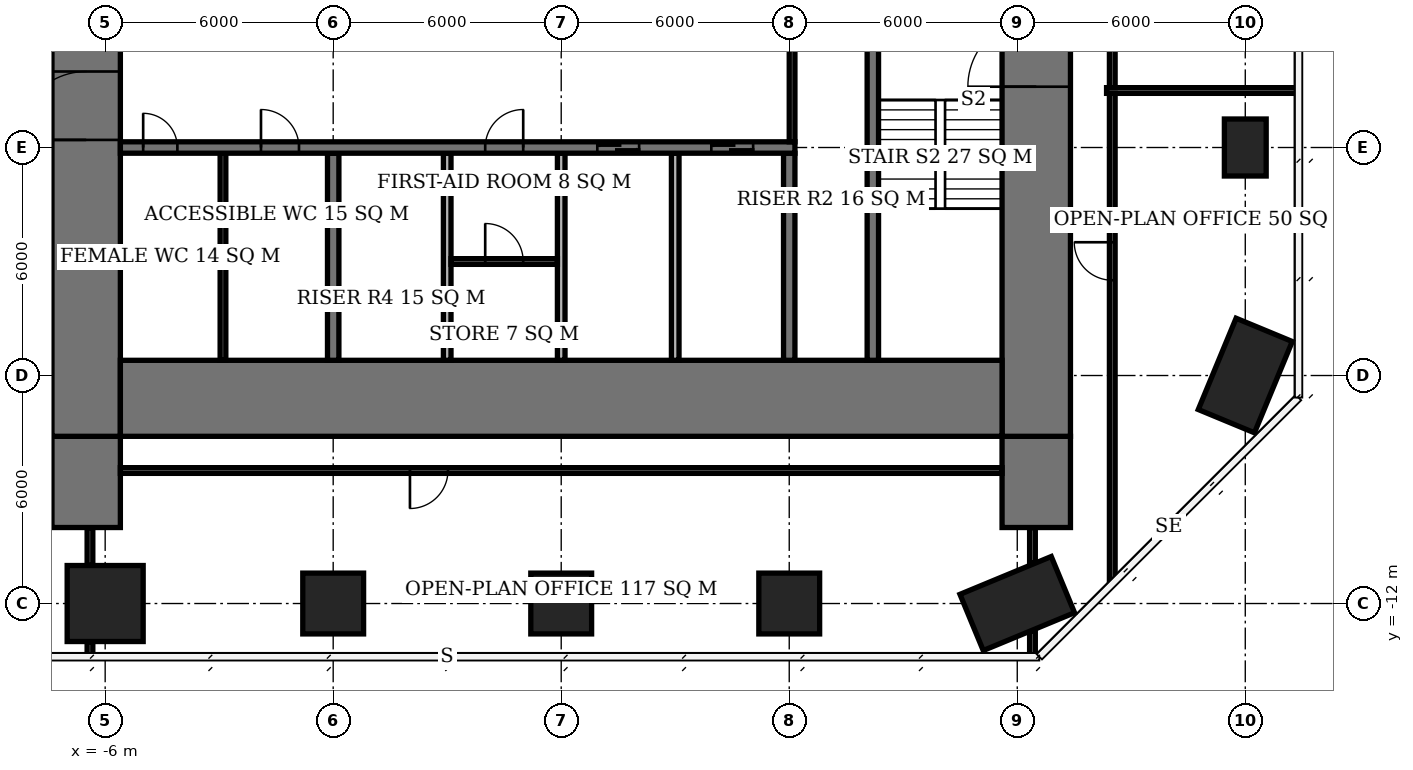
"""IFC4 building model, lengths in metres.
Left out: names, types, materials, properties, quantities, classifications, styles, units other than length and angle.
Written with IfcOpenShell. Run it as: python <this file> out.ifc"""

import sys

from ifc_helpers import new_model, si_unit, direction, frame, frame_2d, origin, origin_2d, place, context, subcontext, project, spatial, rectangle, extrude, element, fill, save


model = new_model("IFC4")
c1 = context("Model", 3, precision=1e-05, world=origin(), true_north=direction((0.0, 1.0)))
c2 = subcontext(c1, "Body", "Model", "MODEL_VIEW")
j1 = project(units=[si_unit("LENGTHUNIT", "METRE"), si_unit("PLANEANGLEUNIT", "RADIAN")], contexts=[c1])
p1 = place(None, origin())
s1 = spatial("IfcSite", under=j1, at=p1, CompositionType="ELEMENT")
p2 = place(p1, origin())
s2 = spatial("IfcBuilding", under=s1, at=p2, CompositionType="ELEMENT")
p3 = place(p2, frame((0.0, 0.0, 204.5)))
s3 = spatial("IfcBuildingStorey", under=s2, at=p3, CompositionType="ELEMENT", Elevation=204.5)
p4 = place(p3, frame((-6.0, -12.0, 0.0), z_axis=(0.0, 0.0, 1.0), x_axis=(1.0, 0.0, 0.0)))
e1 = element("IfcColumn", 1, at=p4, inside=s3, PredefinedType="COLUMN", context=c2, shape_type="SweptSolid", body=[
    extrude(rectangle(XDim=2.0, YDim=2.0, at=origin_2d()), origin(), (0.0, 0.0, 1.0), 3.9),
])
for number, where, z_axis, x_axis in (
    (2, (0.0, -12.0, 0.0), (0.0, 0.0, 1.0), (1.0, 0.0, 0.0)),
    (3, (6.0, -12.0, 0.0), (0.0, 0.0, 1.0), (1.0, 0.0, 0.0)),
    (4, (12.0, -12.0, 0.0), (0.0, 0.0, 1.0), (1.0, 0.0, 0.0)),
):
    element("IfcColumn", number, at=place(p3, frame(where, z_axis=z_axis, x_axis=x_axis)), inside=s3, PredefinedType="COLUMN", context=c2, shape_type="SweptSolid", body=[
        extrude(rectangle(XDim=1.6, YDim=1.6, at=origin_2d()), origin(), (0.0, 0.0, 1.0), 3.9),
    ])
for number, where, z_axis, x_axis in (
    (5, (18.0, -12.0, 0.0), (0.0, 0.0, 1.0), (-0.924, -0.383, 0.0)),
    (6, (24.0, -6.0, 0.0), (0.0, 0.0, 1.0), (-0.383, -0.924, 0.0)),
):
    element("IfcColumn", number, at=place(p3, frame(where, z_axis=z_axis, x_axis=x_axis)), inside=s3, PredefinedType="COLUMN", context=c2, shape_type="SweptSolid", body=[
        extrude(rectangle(XDim=2.6, YDim=1.6, at=origin_2d()), origin(), (0.0, 0.0, 1.0), 3.9),
    ])
p5 = place(p3, frame((24.0, 0.0, 0.0), z_axis=(0.0, 0.0, 1.0), x_axis=(0.0, 1.0, 0.0)))
e7 = element("IfcColumn", 7, at=p5, inside=s3, PredefinedType="COLUMN", context=c2, shape_type="SweptSolid", body=[
    extrude(rectangle(XDim=1.5, YDim=1.1, at=origin_2d()), origin(), (0.0, 0.0, 1.0), 3.9),
])
p6 = place(p3, frame((-5.6, -6.6, 0.0), z_axis=(0.0, 0.0, 1.0), x_axis=(1.0, 0.0, 0.0)))
e8 = element("IfcWall", 8, at=p6, inside=s3, PredefinedType="SHEAR", context=c2, shape_type="SweptSolid", body=[
    extrude(rectangle(XDim=23.2, YDim=2.0, at=frame_2d((11.6, 0.0))), origin(), (0.0, 0.0, 1.0), 3.9),
])
p7 = place(p3, frame((-6.5, -7.6, 0.0), z_axis=(0.0, 0.0, 1.0), x_axis=(0.0, 1.0, 0.0)))
e9 = element("IfcWall", 9, at=p7, inside=s3, PredefinedType="SHEAR", context=c2, shape_type="SweptSolid", body=[
    extrude(rectangle(XDim=21.2, YDim=1.8, at=frame_2d((10.6, 0.0))), origin(), (0.0, 0.0, 1.0), 3.9),
])
p8 = place(p7, frame((7.8, 0.0, 0.0)))
e10 = element("IfcOpeningElement", 10, at=p8, cuts=e9, PredefinedType="OPENING", context=c2, shape_type="SweptSolid", body=[
    extrude(rectangle(XDim=1.8, YDim=2.4, at=frame_2d((0.9, 1.2))), frame((0.0, 0.91, 0.0), z_axis=(0.0, -1.0, 0.0), x_axis=(1.0, 0.0, 0.0)), (0.0, 0.0, 1.0), 1.82),
])
p9 = place(p3, frame((18.5, -7.6, 0.0), z_axis=(0.0, 0.0, 1.0), x_axis=(0.0, 1.0, 0.0)))
e11 = element("IfcWall", 11, at=p9, inside=s3, PredefinedType="SHEAR", context=c2, shape_type="SweptSolid", body=[
    extrude(rectangle(XDim=21.2, YDim=1.8, at=frame_2d((10.6, 0.0))), origin(), (0.0, 0.0, 1.0), 3.9),
])
p10 = place(p9, frame((9.2, 0.0, 0.0)))
e12 = element("IfcOpeningElement", 12, at=p10, cuts=e11, PredefinedType="OPENING", context=c2, shape_type="SweptSolid", body=[
    extrude(rectangle(XDim=1.8, YDim=2.4, at=frame_2d((0.9, 1.2))), frame((0.0, 0.91, 0.0), z_axis=(0.0, -1.0, 0.0), x_axis=(1.0, 0.0, 0.0)), (0.0, 0.0, 1.0), 1.82),
])
for number, where, z_axis, x_axis in (
    (13, (-6.5, -10.0, 0.0), (0.0, 0.0, 1.0), (0.0, 1.0, 0.0)),
    (14, (18.5, -10.0, 0.0), (0.0, 0.0, 1.0), (0.0, 1.0, 0.0)),
):
    element("IfcWall", number, at=place(p3, frame(where, z_axis=z_axis, x_axis=x_axis)), inside=s3, PredefinedType="SHEAR", context=c2, shape_type="SweptSolid", body=[
        extrude(rectangle(XDim=2.4, YDim=1.8, at=frame_2d((1.2, 0.0))), origin(), (0.0, 0.0, 1.0), 3.9),
    ])
p11 = place(p3, frame((-5.6, 0.0, 0.0), z_axis=(0.0, 0.0, 1.0), x_axis=(1.0, 0.0, 0.0)))
e15 = element("IfcWall", 15, at=p11, inside=s3, PredefinedType="SHEAR", context=c2, shape_type="SweptSolid", body=[
    extrude(rectangle(XDim=17.75, YDim=0.3, at=frame_2d((8.875, 0.0))), origin(), (0.0, 0.0, 1.0), 3.9),
])
p12 = place(p11, frame((0.6, 0.0, 0.0)))
e16 = element("IfcOpeningElement", 16, at=p12, cuts=e15, PredefinedType="OPENING", context=c2, shape_type="SweptSolid", body=[
    extrude(rectangle(XDim=0.9, YDim=2.1, at=frame_2d((0.45, 1.05))), frame((0.0, 0.16, 0.0), z_axis=(0.0, -1.0, 0.0), x_axis=(1.0, 0.0, 0.0)), (0.0, 0.0, 1.0), 0.32),
])
p13 = place(p11, frame((3.7, 0.0, 0.0)))
e17 = element("IfcOpeningElement", 17, at=p13, cuts=e15, PredefinedType="OPENING", context=c2, shape_type="SweptSolid", body=[
    extrude(rectangle(XDim=1.0, YDim=2.1, at=frame_2d((0.5, 1.05))), frame((0.0, 0.16, 0.0), z_axis=(0.0, -1.0, 0.0), x_axis=(1.0, 0.0, 0.0)), (0.0, 0.0, 1.0), 0.32),
])
p14 = place(p11, frame((9.6, 0.0, 0.0)))
e18 = element("IfcOpeningElement", 18, at=p14, cuts=e15, PredefinedType="OPENING", context=c2, shape_type="SweptSolid", body=[
    extrude(rectangle(XDim=1.0, YDim=2.1, at=frame_2d((0.5, 1.05))), frame((0.0, 0.16, 0.0), z_axis=(0.0, -1.0, 0.0), x_axis=(1.0, 0.0, 0.0)), (0.0, 0.0, 1.0), 0.32),
])
p15 = place(p11, frame((12.55, 0.0, 0.0)))
e19 = element("IfcOpeningElement", 19, at=p15, cuts=e15, PredefinedType="OPENING", context=c2, shape_type="SweptSolid", body=[
    extrude(rectangle(XDim=1.1, YDim=2.1, at=frame_2d((0.55, 1.05))), frame((0.0, 0.16, 0.0), z_axis=(0.0, -1.0, 0.0), x_axis=(1.0, 0.0, 0.0)), (0.0, 0.0, 1.0), 0.32),
])
p16 = place(p11, frame((15.55, 0.0, 0.0)))
e20 = element("IfcOpeningElement", 20, at=p16, cuts=e15, PredefinedType="OPENING", context=c2, shape_type="SweptSolid", body=[
    extrude(rectangle(XDim=1.1, YDim=2.1, at=frame_2d((0.55, 1.05))), frame((0.0, 0.16, 0.0), z_axis=(0.0, -1.0, 0.0), x_axis=(1.0, 0.0, 0.0)), (0.0, 0.0, 1.0), 0.32),
])
for number, where, z_axis, x_axis in (
    (21, (0.0, -5.6, 0.0), (0.0, 0.0, 1.0), (0.0, 1.0, 0.0)),
    (22, (12.0, -5.6, 0.0), (0.0, 0.0, 1.0), (0.0, 1.0, 0.0)),
):
    element("IfcWall", number, at=place(p3, frame(where, z_axis=z_axis, x_axis=x_axis)), inside=s3, PredefinedType="SHEAR", context=c2, shape_type="SweptSolid", body=[
        extrude(rectangle(XDim=5.45, YDim=0.3, at=frame_2d((2.725, 0.0))), origin(), (0.0, 0.0, 1.0), 3.9),
    ])
p17 = place(p3, frame((14.2, -5.6, 0.0), z_axis=(0.0, 0.0, 1.0), x_axis=(0.0, 1.0, 0.0)))
e23 = element("IfcWall", 23, at=p17, inside=s3, PredefinedType="SHEAR", context=c2, shape_type="SweptSolid", body=[
    extrude(rectangle(XDim=8.45, YDim=0.3, at=frame_2d((4.225, 0.0))), origin(), (0.0, 0.0, 1.0), 3.9),
])
for number, where, z_axis, x_axis in (
    (24, (3.0, -5.6, 0.0), (0.0, 0.0, 1.0), (0.0, 1.0, 0.0)),
    (25, (6.0, -5.6, 0.0), (0.0, 0.0, 1.0), (0.0, 1.0, 0.0)),
    (26, (9.0, -5.6, 0.0), (0.0, 0.0, 1.0), (0.0, 1.0, 0.0)),
):
    element("IfcWall", number, at=place(p3, frame(where, z_axis=z_axis, x_axis=x_axis)), inside=s3, PredefinedType="SOLIDWALL", context=c2, shape_type="SweptSolid", body=[
        extrude(rectangle(XDim=5.45, YDim=0.2, at=frame_2d((2.725, 0.0))), origin(), (0.0, 0.0, 1.0), 3.9),
    ])
p18 = place(p3, frame((-2.9, -5.6, 0.0), z_axis=(0.0, 0.0, 1.0), x_axis=(0.0, 1.0, 0.0)))
e27 = element("IfcWall", 27, at=p18, inside=s3, PredefinedType="PLUMBINGWALL", context=c2, shape_type="SweptSolid", body=[
    extrude(rectangle(XDim=5.45, YDim=0.15, at=frame_2d((2.725, 0.0))), origin(), (0.0, 0.0, 1.0), 3.65),
])
p19 = place(p3, frame((3.1, -3.0, 0.0), z_axis=(0.0, 0.0, 1.0), x_axis=(1.0, 0.0, 0.0)))
e28 = element("IfcWall", 28, at=p19, inside=s3, PredefinedType="PARTITIONING", context=c2, shape_type="SweptSolid", body=[
    extrude(rectangle(XDim=2.8, YDim=0.15, at=frame_2d((1.4, 0.0))), origin(), (0.0, 0.0, 1.0), 3.65),
])
p20 = place(p19, frame((0.9, 0.0, 0.0)))
e29 = element("IfcOpeningElement", 29, at=p20, cuts=e28, PredefinedType="OPENING", context=c2, shape_type="SweptSolid", body=[
    extrude(rectangle(XDim=1.0, YDim=2.1, at=frame_2d((0.5, 1.05))), frame((0.0, 0.085, 0.0), z_axis=(0.0, -1.0, 0.0), x_axis=(1.0, 0.0, 0.0)), (0.0, 0.0, 1.0), 0.17),
])
p21 = place(p3, frame((-6.4, -13.35, 0.0), z_axis=(0.0, 0.0, 1.0), x_axis=(0.0, 1.0, 0.0)))
e30 = element("IfcWall", 30, at=p21, inside=s3, PredefinedType="PARTITIONING", context=c2, shape_type="SweptSolid", body=[
    extrude(rectangle(XDim=0.35, YDim=0.15, at=frame_2d((0.175, 0.0))), origin(), (0.0, 0.0, 1.0), 3.65),
])
p22 = place(p3, frame((-6.4, -11.0, 0.0), z_axis=(0.0, 0.0, 1.0), x_axis=(0.0, 1.0, 0.0)))
e31 = element("IfcWall", 31, at=p22, inside=s3, PredefinedType="PARTITIONING", context=c2, shape_type="SweptSolid", body=[
    extrude(rectangle(XDim=1.0, YDim=0.15, at=frame_2d((0.5, 0.0))), origin(), (0.0, 0.0, 1.0), 3.65),
])
p23 = place(p3, frame((17.6, -8.5, 0.0), z_axis=(0.0, 0.0, 1.0), x_axis=(-1.0, 0.0, 0.0)))
e32 = element("IfcWall", 32, at=p23, inside=s3, PredefinedType="PARTITIONING", context=c2, shape_type="SweptSolid", body=[
    extrude(rectangle(XDim=23.2, YDim=0.15, at=frame_2d((11.6, 0.0))), origin(), (0.0, 0.0, 1.0), 3.65),
])
p24 = place(p23, frame((14.58, 0.0, 0.0)))
e33 = element("IfcOpeningElement", 33, at=p24, cuts=e32, PredefinedType="OPENING", context=c2, shape_type="SweptSolid", body=[
    extrude(rectangle(XDim=1.0, YDim=2.1, at=frame_2d((0.5, 1.05))), frame((0.0, 0.085, 0.0), z_axis=(0.0, -1.0, 0.0), x_axis=(1.0, 0.0, 0.0)), (0.0, 0.0, 1.0), 0.17),
])
p25 = place(p3, frame((18.4, -13.4, 0.0), z_axis=(0.0, 0.0, 1.0), x_axis=(0.0, 1.0, 0.0)))
e34 = element("IfcWall", 34, at=p25, inside=s3, PredefinedType="PARTITIONING", context=c2, shape_type="SweptSolid", body=[
    extrude(rectangle(XDim=0.669, YDim=0.15, at=frame_2d((0.334, 0.0))), origin(), (0.0, 0.0, 1.0), 3.65),
])
p26 = place(p3, frame((18.4, -10.937, 0.0), z_axis=(0.0, 0.0, 1.0), x_axis=(0.0, 1.0, 0.0)))
e35 = element("IfcWall", 35, at=p26, inside=s3, PredefinedType="PARTITIONING", context=c2, shape_type="SweptSolid", body=[
    extrude(rectangle(XDim=0.937, YDim=0.15, at=frame_2d((0.469, 0.0))), origin(), (0.0, 0.0, 1.0), 3.65),
])
p27 = place(p3, frame((20.5, -11.388, 0.0), z_axis=(0.0, 0.0, 1.0), x_axis=(0.0, 1.0, 0.0)))
e36 = element("IfcWall", 36, at=p27, inside=s3, PredefinedType="PARTITIONING", context=c2, shape_type="SweptSolid", body=[
    extrude(rectangle(XDim=12.813, YDim=0.15, at=frame_2d((6.406, 0.0))), origin(), (0.0, 0.0, 1.0), 3.65),
])
p28 = place(p27, frame((7.895, 0.0, 0.0)))
e37 = element("IfcOpeningElement", 37, at=p28, cuts=e36, PredefinedType="OPENING", context=c2, shape_type="SweptSolid", body=[
    extrude(rectangle(XDim=1.0, YDim=2.1, at=frame_2d((0.5, 1.05))), frame((0.0, 0.085, 0.0), z_axis=(0.0, -1.0, 0.0), x_axis=(1.0, 0.0, 0.0)), (0.0, 0.0, 1.0), 0.17),
])
p29 = place(p3, frame((20.5, 1.575, 0.0), z_axis=(0.0, 0.0, 1.0), x_axis=(0.0, 1.0, 0.0)))
e38 = element("IfcWall", 38, at=p29, inside=s3, PredefinedType="PARTITIONING", context=c2, shape_type="SweptSolid", body=[
    extrude(rectangle(XDim=8.85, YDim=0.15, at=frame_2d((4.425, 0.0))), origin(), (0.0, 0.0, 1.0), 3.65),
])
p30 = place(p29, frame((5.275, 0.0, 0.0)))
e39 = element("IfcOpeningElement", 39, at=p30, cuts=e38, PredefinedType="OPENING", context=c2, shape_type="SweptSolid", body=[
    extrude(rectangle(XDim=1.0, YDim=2.1, at=frame_2d((0.5, 1.05))), frame((0.0, 0.085, 0.0), z_axis=(0.0, -1.0, 0.0), x_axis=(1.0, 0.0, 0.0)), (0.0, 0.0, 1.0), 0.17),
])
p31 = place(p3, frame((20.35, 1.5, 0.0), z_axis=(0.0, 0.0, 1.0), x_axis=(1.0, 0.0, 0.0)))
e40 = element("IfcWall", 40, at=p31, inside=s3, PredefinedType="PARTITIONING", context=c2, shape_type="SweptSolid", body=[
    extrude(rectangle(XDim=5.05, YDim=0.15, at=frame_2d((2.525, 0.0))), origin(), (0.0, 0.0, 1.0), 3.65),
])
p32 = place(p3, frame((12.075, 0.15, 0.0), z_axis=(0.0, 0.0, 1.0), x_axis=(0.0, 1.0, 0.0)))
e41 = element("IfcWall", 41, at=p32, inside=s3, PredefinedType="PARTITIONING", context=c2, shape_type="SweptSolid", body=[
    extrude(rectangle(XDim=3.0, YDim=0.15, at=frame_2d((1.5, 0.0))), origin(), (0.0, 0.0, 1.0), 3.65),
])
p33 = place(p8, origin())
e42 = element("IfcDoor", 42, at=p33, inside=s3, OperationType="DOUBLE_DOOR_SINGLE_SWING", PredefinedType="DOOR", context=c2, shape_type="SweptSolid", body=[
    extrude(rectangle(XDim=1.8, YDim=2.4, at=frame_2d((0.9, 1.2))), frame((0.0, 0.025, 0.0), z_axis=(0.0, -1.0, 0.0), x_axis=(1.0, 0.0, 0.0)), (0.0, 0.0, 1.0), 0.05),
])
fill(e10, e42)
p34 = place(p10, origin())
e43 = element("IfcDoor", 43, at=p34, inside=s3, OperationType="DOUBLE_DOOR_SINGLE_SWING", PredefinedType="DOOR", context=c2, shape_type="SweptSolid", body=[
    extrude(rectangle(XDim=1.8, YDim=2.4, at=frame_2d((0.9, 1.2))), frame((0.0, 0.025, 0.0), z_axis=(0.0, -1.0, 0.0), x_axis=(1.0, 0.0, 0.0)), (0.0, 0.0, 1.0), 0.05),
])
fill(e12, e43)
p35 = place(p12, origin())
e44 = element("IfcDoor", 44, at=p35, inside=s3, OperationType="SINGLE_SWING_LEFT", PredefinedType="DOOR", context=c2, shape_type="SweptSolid", body=[
    extrude(rectangle(XDim=0.9, YDim=2.1, at=frame_2d((0.45, 1.05))), frame((0.0, 0.025, 0.0), z_axis=(0.0, -1.0, 0.0), x_axis=(1.0, 0.0, 0.0)), (0.0, 0.0, 1.0), 0.05),
])
fill(e16, e44)
p36 = place(p13, origin())
e45 = element("IfcDoor", 45, at=p36, inside=s3, OperationType="SINGLE_SWING_LEFT", PredefinedType="DOOR", context=c2, shape_type="SweptSolid", body=[
    extrude(rectangle(XDim=1.0, YDim=2.1, at=frame_2d((0.5, 1.05))), frame((0.0, 0.025, 0.0), z_axis=(0.0, -1.0, 0.0), x_axis=(1.0, 0.0, 0.0)), (0.0, 0.0, 1.0), 0.05),
])
fill(e17, e45)
p37 = place(p20, origin())
e46 = element("IfcDoor", 46, at=p37, inside=s3, OperationType="SINGLE_SWING_LEFT", PredefinedType="DOOR", context=c2, shape_type="SweptSolid", body=[
    extrude(rectangle(XDim=1.0, YDim=2.1, at=frame_2d((0.5, 1.05))), frame((0.0, 0.025, 0.0), z_axis=(0.0, -1.0, 0.0), x_axis=(1.0, 0.0, 0.0)), (0.0, 0.0, 1.0), 0.05),
])
fill(e29, e46)
p38 = place(p14, origin())
e47 = element("IfcDoor", 47, at=p38, inside=s3, OperationType="SINGLE_SWING_RIGHT", PredefinedType="DOOR", context=c2, shape_type="SweptSolid", body=[
    extrude(rectangle(XDim=1.0, YDim=2.1, at=frame_2d((0.5, 1.05))), frame((0.0, 0.025, 0.0), z_axis=(0.0, -1.0, 0.0), x_axis=(1.0, 0.0, 0.0)), (0.0, 0.0, 1.0), 0.05),
])
fill(e18, e47)
p39 = place(p15, origin())
e48 = element("IfcDoor", 48, at=p39, inside=s3, OperationType="DOUBLE_DOOR_SLIDING", PredefinedType="USERDEFINED", context=c2, shape_type="SweptSolid", body=[
    extrude(rectangle(XDim=1.1, YDim=2.1, at=frame_2d((0.55, 1.05))), frame((0.0, 0.025, 0.0), z_axis=(0.0, -1.0, 0.0), x_axis=(1.0, 0.0, 0.0)), (0.0, 0.0, 1.0), 0.05),
])
fill(e19, e48)
p40 = place(p16, origin())
e49 = element("IfcDoor", 49, at=p40, inside=s3, OperationType="DOUBLE_DOOR_SLIDING", PredefinedType="USERDEFINED", context=c2, shape_type="SweptSolid", body=[
    extrude(rectangle(XDim=1.1, YDim=2.1, at=frame_2d((0.55, 1.05))), frame((0.0, 0.025, 0.0), z_axis=(0.0, -1.0, 0.0), x_axis=(1.0, 0.0, 0.0)), (0.0, 0.0, 1.0), 0.05),
])
fill(e20, e49)
p41 = place(p28, origin())
e50 = element("IfcDoor", 50, at=p41, inside=s3, OperationType="SINGLE_SWING_RIGHT", PredefinedType="DOOR", context=c2, shape_type="SweptSolid", body=[
    extrude(rectangle(XDim=1.0, YDim=2.1, at=frame_2d((0.5, 1.05))), frame((0.0, 0.025, 0.0), z_axis=(0.0, -1.0, 0.0), x_axis=(1.0, 0.0, 0.0)), (0.0, 0.0, 1.0), 0.05),
])
fill(e37, e50)
p42 = place(p24, origin())
e51 = element("IfcDoor", 51, at=p42, inside=s3, OperationType="SINGLE_SWING_RIGHT", PredefinedType="DOOR", context=c2, shape_type="SweptSolid", body=[
    extrude(rectangle(XDim=1.0, YDim=2.1, at=frame_2d((0.5, 1.05))), frame((0.0, 0.025, 0.0), z_axis=(0.0, -1.0, 0.0), x_axis=(1.0, 0.0, 0.0)), (0.0, 0.0, 1.0), 0.05),
])
fill(e33, e51)
save(model, sys.argv[1])
